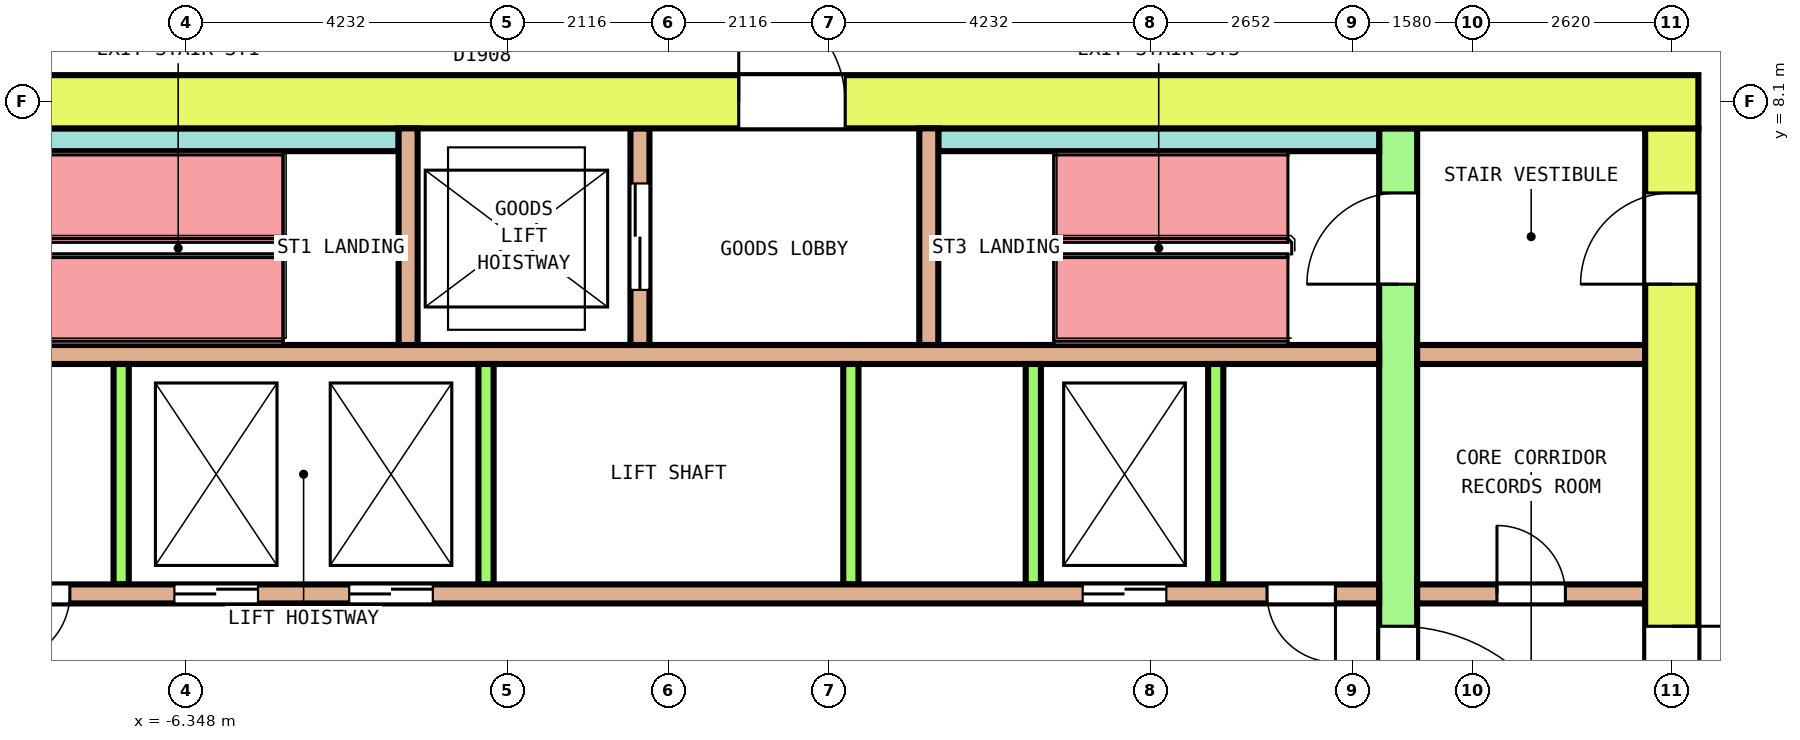
"""IFC4 building model, lengths in metres.
Left out: names, types, materials, properties, quantities, classifications, styles, units other than length and angle.
Written with IfcOpenShell. Run it as: python <this file> out.ifc"""

import sys

from ifc_helpers import new_model, si_unit, direction, frame, frame_2d, origin, place, context, subcontext, project, spatial, rectangle, extrude, element, fill, save


model = new_model("IFC4")
c1 = context("Model", 3, precision=1e-05, world=origin(), true_north=direction((0.0, 1.0)))
c2 = subcontext(c1, "Body", "Model", "MODEL_VIEW")
j1 = project(units=[si_unit("LENGTHUNIT", "METRE"), si_unit("PLANEANGLEUNIT", "RADIAN")], contexts=[c1])
p1 = place(None, origin())
s1 = spatial("IfcSite", under=j1, at=p1, CompositionType="ELEMENT")
p2 = place(p1, origin())
s2 = spatial("IfcBuilding", under=s1, at=p2, CompositionType="ELEMENT")
p3 = place(p2, frame((0.0, 0.0, 193.6)))
s3 = spatial("IfcBuildingStorey", under=s2, at=p3, CompositionType="ELEMENT", Elevation=193.6)
p4 = place(p3, frame((-13.55, 8.1, 0.0), z_axis=(0.0, 0.0, 1.0), x_axis=(1.0, 0.0, 0.0)))
e1 = element("IfcWall", 1, at=p4, inside=s3, PredefinedType="SHEAR", context=c2, shape_type="SweptSolid", body=[
    extrude(rectangle(XDim=27.1, YDim=0.7, at=frame_2d((13.55, 0.0))), origin(), (0.0, 0.0, 1.0), 4.1),
])
p5 = place(p4, frame((14.475, 0.0, 0.0)))
e2 = element("IfcOpeningElement", 2, at=p5, cuts=e1, PredefinedType="OPENING", context=c2, shape_type="SweptSolid", body=[
    extrude(rectangle(XDim=1.4, YDim=2.1, at=frame_2d((0.7, 1.05))), frame((0.0, 0.36, 0.0), z_axis=(0.0, -1.0, 0.0), x_axis=(1.0, 0.0, 0.0)), (0.0, 0.0, 1.0), 0.72),
])
p6 = place(p3, frame((13.2, -7.75, 0.0), z_axis=(0.0, 0.0, 1.0), x_axis=(0.0, 1.0, 0.0)))
e3 = element("IfcWall", 3, at=p6, inside=s3, PredefinedType="SHEAR", context=c2, shape_type="SweptSolid", body=[
    extrude(rectangle(XDim=15.5, YDim=0.7, at=frame_2d((7.75, 0.0))), origin(), (0.0, 0.0, 1.0), 4.1),
])
p7 = place(p6, frame((6.55, 0.0, 0.0)))
e4 = element("IfcOpeningElement", 4, at=p7, cuts=e3, PredefinedType="OPENING", context=c2, shape_type="SweptSolid", body=[
    extrude(rectangle(XDim=2.4, YDim=2.1, at=frame_2d((1.2, 1.05))), frame((0.0, 0.36, 0.0), z_axis=(0.0, -1.0, 0.0), x_axis=(1.0, 0.0, 0.0)), (0.0, 0.0, 1.0), 0.72),
])
p8 = place(p6, frame((13.45, 0.0, 0.0)))
e5 = element("IfcOpeningElement", 5, at=p8, cuts=e3, PredefinedType="OPENING", context=c2, shape_type="SweptSolid", body=[
    extrude(rectangle(XDim=1.2, YDim=2.1, at=frame_2d((0.6, 1.05))), frame((0.0, 0.36, 0.0), z_axis=(0.0, -1.0, 0.0), x_axis=(1.0, 0.0, 0.0)), (0.0, 0.0, 1.0), 0.72),
])
p9 = place(p6, frame((0.181, 0.0, 0.0)))
e6 = element("IfcOpeningElement", 6, at=p9, cuts=e3, PredefinedType="OPENING", context=c2, shape_type="SweptSolid", body=[
    extrude(rectangle(XDim=1.0, YDim=2.1, at=frame_2d((0.5, 1.05))), frame((0.0, 0.36, 0.0), z_axis=(0.0, -1.0, 0.0), x_axis=(1.0, 0.0, 0.0)), (0.0, 0.0, 1.0), 0.72),
])
p10 = place(p6, frame((1.669, 0.0, 0.0)))
e7 = element("IfcOpeningElement", 7, at=p10, cuts=e3, PredefinedType="OPENING", context=c2, shape_type="SweptSolid", body=[
    extrude(rectangle(XDim=1.0, YDim=2.1, at=frame_2d((0.5, 1.05))), frame((0.0, 0.36, 0.0), z_axis=(0.0, -1.0, 0.0), x_axis=(1.0, 0.0, 0.0)), (0.0, 0.0, 1.0), 0.72),
])
p11 = place(p3, frame((9.6, -7.75, 0.0), z_axis=(0.0, 0.0, 1.0), x_axis=(0.0, 1.0, 0.0)))
e8 = element("IfcWall", 8, at=p11, inside=s3, PredefinedType="SHEAR", context=c2, shape_type="SweptSolid", body=[
    extrude(rectangle(XDim=15.5, YDim=0.5, at=frame_2d((7.75, 0.0))), origin(), (0.0, 0.0, 1.0), 4.1),
])
p12 = place(p11, frame((6.55, 0.0, 0.0)))
e9 = element("IfcOpeningElement", 9, at=p12, cuts=e8, PredefinedType="OPENING", context=c2, shape_type="SweptSolid", body=[
    extrude(rectangle(XDim=2.4, YDim=2.1, at=frame_2d((1.2, 1.05))), frame((0.0, 0.26, 0.0), z_axis=(0.0, -1.0, 0.0), x_axis=(1.0, 0.0, 0.0)), (0.0, 0.0, 1.0), 0.52),
])
p13 = place(p11, frame((13.45, 0.0, 0.0)))
e10 = element("IfcOpeningElement", 10, at=p13, cuts=e8, PredefinedType="OPENING", context=c2, shape_type="SweptSolid", body=[
    extrude(rectangle(XDim=1.2, YDim=2.1, at=frame_2d((0.6, 1.05))), frame((0.0, 0.26, 0.0), z_axis=(0.0, -1.0, 0.0), x_axis=(1.0, 0.0, 0.0)), (0.0, 0.0, 1.0), 0.52),
])
p14 = place(p11, frame((0.95, 0.0, 0.0)))
e11 = element("IfcOpeningElement", 11, at=p14, cuts=e8, PredefinedType="OPENING", context=c2, shape_type="SweptSolid", body=[
    extrude(rectangle(XDim=1.0, YDim=2.1, at=frame_2d((0.5, 1.05))), frame((0.0, 0.26, 0.0), z_axis=(0.0, -1.0, 0.0), x_axis=(1.0, 0.0, 0.0)), (0.0, 0.0, 1.0), 0.52),
])
p15 = place(p3, frame((-9.35, 1.625, 0.0), z_axis=(0.0, 0.0, 1.0), x_axis=(1.0, 0.0, 0.0)))
e12 = element("IfcWall", 12, at=p15, inside=s3, PredefinedType="SOLIDWALL", context=c2, shape_type="SweptSolid", body=[
    extrude(rectangle(XDim=18.7, YDim=0.25, at=frame_2d((9.35, 0.0))), origin(), (0.0, 0.0, 1.0), 4.1),
])
p16 = place(p15, frame((2.85, 0.0, 0.0)))
e13 = element("IfcOpeningElement", 13, at=p16, cuts=e12, PredefinedType="OPENING", context=c2, shape_type="SweptSolid", body=[
    extrude(rectangle(XDim=1.1, YDim=2.1, at=frame_2d((0.55, 1.05))), frame((0.0, 0.135, 0.0), z_axis=(0.0, -1.0, 0.0), x_axis=(1.0, 0.0, 0.0)), (0.0, 0.0, 1.0), 0.27),
])
p17 = place(p15, frame((5.15, 0.0, 0.0)))
e14 = element("IfcOpeningElement", 14, at=p17, cuts=e12, PredefinedType="OPENING", context=c2, shape_type="SweptSolid", body=[
    extrude(rectangle(XDim=1.1, YDim=2.1, at=frame_2d((0.55, 1.05))), frame((0.0, 0.135, 0.0), z_axis=(0.0, -1.0, 0.0), x_axis=(1.0, 0.0, 0.0)), (0.0, 0.0, 1.0), 0.27),
])
p18 = place(p15, frame((14.8, 0.0, 0.0)))
e15 = element("IfcOpeningElement", 15, at=p18, cuts=e12, PredefinedType="OPENING", context=c2, shape_type="SweptSolid", body=[
    extrude(rectangle(XDim=1.1, YDim=2.1, at=frame_2d((0.55, 1.05))), frame((0.0, 0.135, 0.0), z_axis=(0.0, -1.0, 0.0), x_axis=(1.0, 0.0, 0.0)), (0.0, 0.0, 1.0), 0.27),
])
p19 = place(p15, frame((0.575, 0.0, 0.0)))
e16 = element("IfcOpeningElement", 16, at=p19, cuts=e12, PredefinedType="OPENING", context=c2, shape_type="SweptSolid", body=[
    extrude(rectangle(XDim=0.9, YDim=2.1, at=frame_2d((0.45, 1.05))), frame((0.0, 0.135, 0.0), z_axis=(0.0, -1.0, 0.0), x_axis=(1.0, 0.0, 0.0)), (0.0, 0.0, 1.0), 0.27),
])
p20 = place(p15, frame((17.225, 0.0, 0.0)))
e17 = element("IfcOpeningElement", 17, at=p20, cuts=e12, PredefinedType="OPENING", context=c2, shape_type="SweptSolid", body=[
    extrude(rectangle(XDim=0.9, YDim=2.1, at=frame_2d((0.45, 1.05))), frame((0.0, 0.135, 0.0), z_axis=(0.0, -1.0, 0.0), x_axis=(1.0, 0.0, 0.0)), (0.0, 0.0, 1.0), 0.27),
])
p21 = place(p3, frame((9.85, 1.625, 0.0), z_axis=(0.0, 0.0, 1.0), x_axis=(1.0, 0.0, 0.0)))
e18 = element("IfcWall", 18, at=p21, inside=s3, PredefinedType="SOLIDWALL", context=c2, shape_type="SweptSolid", body=[
    extrude(rectangle(XDim=3.0, YDim=0.25, at=frame_2d((1.5, 0.0))), origin(), (0.0, 0.0, 1.0), 4.1),
])
p22 = place(p21, frame((1.05, 0.0, 0.0)))
e19 = element("IfcOpeningElement", 19, at=p22, cuts=e18, PredefinedType="OPENING", context=c2, shape_type="SweptSolid", body=[
    extrude(rectangle(XDim=0.9, YDim=2.1, at=frame_2d((0.45, 1.05))), frame((0.0, 0.135, 0.0), z_axis=(0.0, -1.0, 0.0), x_axis=(1.0, 0.0, 0.0)), (0.0, 0.0, 1.0), 0.27),
])
p23 = place(p3, frame((-9.35, 4.775, 0.0), z_axis=(0.0, 0.0, 1.0), x_axis=(1.0, 0.0, 0.0)))
e20 = element("IfcWall", 20, at=p23, inside=s3, PredefinedType="SOLIDWALL", context=c2, shape_type="SweptSolid", body=[
    extrude(rectangle(XDim=18.7, YDim=0.25, at=frame_2d((9.35, 0.0))), origin(), (0.0, 0.0, 1.0), 4.1),
])
p24 = place(p3, frame((9.85, 4.775, 0.0), z_axis=(0.0, 0.0, 1.0), x_axis=(1.0, 0.0, 0.0)))
e21 = element("IfcWall", 21, at=p24, inside=s3, PredefinedType="SOLIDWALL", context=c2, shape_type="SweptSolid", body=[
    extrude(rectangle(XDim=3.0, YDim=0.25, at=frame_2d((1.5, 0.0))), origin(), (0.0, 0.0, 1.0), 4.1),
])
for number, where, z_axis, x_axis in (
    (22, (-7.2, 1.75, 0.0), (0.0, 0.0, 1.0), (0.0, 1.0, 0.0)),
    (23, (-2.4, 1.75, 0.0), (0.0, 0.0, 1.0), (0.0, 1.0, 0.0)),
    (24, (2.4, 1.75, 0.0), (0.0, 0.0, 1.0), (0.0, 1.0, 0.0)),
    (25, (4.8, 1.75, 0.0), (0.0, 0.0, 1.0), (0.0, 1.0, 0.0)),
    (26, (7.2, 1.75, 0.0), (0.0, 0.0, 1.0), (0.0, 1.0, 0.0)),
):
    element("IfcWall", number, at=place(p3, frame(where, z_axis=z_axis, x_axis=x_axis)), inside=s3, PredefinedType="SOLIDWALL", context=c2, shape_type="SweptSolid", body=[
        extrude(rectangle(XDim=2.9, YDim=0.2, at=frame_2d((1.45, 0.0))), origin(), (0.0, 0.0, 1.0), 4.1),
    ])
for number, where, z_axis, x_axis in (
    (27, (-9.35, 7.6, 0.0), (0.0, 0.0, 1.0), (1.0, 0.0, 0.0)),
    (28, (3.55, 7.6, 0.0), (0.0, 0.0, 1.0), (1.0, 0.0, 0.0)),
):
    element("IfcWall", number, at=place(p3, frame(where, z_axis=z_axis, x_axis=x_axis)), inside=s3, PredefinedType="SOLIDWALL", context=c2, shape_type="SweptSolid", body=[
        extrude(rectangle(XDim=5.8, YDim=0.3, at=frame_2d((2.9, 0.0))), origin(), (0.0, 0.0, 1.0), 4.1),
    ])
p25 = place(p3, frame((-3.425, 4.9, 0.0), z_axis=(0.0, 0.0, 1.0), x_axis=(0.0, 1.0, 0.0)))
e29 = element("IfcWall", 29, at=p25, inside=s3, PredefinedType="SOLIDWALL", context=c2, shape_type="SweptSolid", body=[
    extrude(rectangle(XDim=2.85, YDim=0.25, at=frame_2d((1.425, 0.0))), origin(), (0.0, 0.0, 1.0), 4.1),
])
p26 = place(p3, frame((-0.375, 4.9, 0.0), z_axis=(0.0, 0.0, 1.0), x_axis=(0.0, 1.0, 0.0)))
e30 = element("IfcWall", 30, at=p26, inside=s3, PredefinedType="SOLIDWALL", context=c2, shape_type="SweptSolid", body=[
    extrude(rectangle(XDim=2.85, YDim=0.25, at=frame_2d((1.425, 0.0))), origin(), (0.0, 0.0, 1.0), 4.1),
])
p27 = place(p26, frame((0.725, 0.0, 0.0)))
e31 = element("IfcOpeningElement", 31, at=p27, cuts=e30, PredefinedType="OPENING", context=c2, shape_type="SweptSolid", body=[
    extrude(rectangle(XDim=1.4, YDim=2.1, at=frame_2d((0.7, 1.05))), frame((0.0, 0.135, 0.0), z_axis=(0.0, -1.0, 0.0), x_axis=(1.0, 0.0, 0.0)), (0.0, 0.0, 1.0), 0.27),
])
p28 = place(p3, frame((3.425, 4.9, 0.0), z_axis=(0.0, 0.0, 1.0), x_axis=(0.0, 1.0, 0.0)))
e32 = element("IfcWall", 32, at=p28, inside=s3, PredefinedType="SOLIDWALL", context=c2, shape_type="SweptSolid", body=[
    extrude(rectangle(XDim=2.85, YDim=0.25, at=frame_2d((1.425, 0.0))), origin(), (0.0, 0.0, 1.0), 4.1),
])
p29 = place(p16, origin())
e33 = element("IfcDoor", 33, at=p29, inside=s3, OperationType="DOUBLE_DOOR_SLIDING", PredefinedType="DOOR", context=c2, shape_type="SweptSolid", body=[
    extrude(rectangle(XDim=1.1, YDim=2.1, at=frame_2d((0.55, 1.05))), frame((0.0, 0.075, 0.0), z_axis=(0.0, -1.0, 0.0), x_axis=(1.0, 0.0, 0.0)), (0.0, 0.0, 1.0), 0.15),
])
fill(e13, e33)
p30 = place(p17, origin())
e34 = element("IfcDoor", 34, at=p30, inside=s3, OperationType="DOUBLE_DOOR_SLIDING", PredefinedType="DOOR", context=c2, shape_type="SweptSolid", body=[
    extrude(rectangle(XDim=1.1, YDim=2.1, at=frame_2d((0.55, 1.05))), frame((0.0, 0.075, 0.0), z_axis=(0.0, -1.0, 0.0), x_axis=(1.0, 0.0, 0.0)), (0.0, 0.0, 1.0), 0.15),
])
fill(e14, e34)
p31 = place(p18, origin())
e35 = element("IfcDoor", 35, at=p31, inside=s3, OperationType="DOUBLE_DOOR_SLIDING", PredefinedType="DOOR", context=c2, shape_type="SweptSolid", body=[
    extrude(rectangle(XDim=1.1, YDim=2.1, at=frame_2d((0.55, 1.05))), frame((0.0, 0.075, 0.0), z_axis=(0.0, -1.0, 0.0), x_axis=(1.0, 0.0, 0.0)), (0.0, 0.0, 1.0), 0.15),
])
fill(e15, e35)
p32 = place(p27, origin())
e36 = element("IfcDoor", 36, at=p32, inside=s3, OperationType="DOUBLE_DOOR_SLIDING", PredefinedType="DOOR", context=c2, shape_type="SweptSolid", body=[
    extrude(rectangle(XDim=1.4, YDim=2.1, at=frame_2d((0.7, 1.05))), frame((0.0, 0.075, 0.0), z_axis=(0.0, -1.0, 0.0), x_axis=(1.0, 0.0, 0.0)), (0.0, 0.0, 1.0), 0.15),
])
fill(e31, e36)
p33 = place(p12, origin())
e37 = element("IfcDoor", 37, at=p33, inside=s3, OperationType="DOUBLE_DOOR_SINGLE_SWING", PredefinedType="DOOR", context=c2, shape_type="SweptSolid", body=[
    extrude(rectangle(XDim=2.4, YDim=2.1, at=frame_2d((1.2, 1.05))), frame((0.0, 0.2, 0.0), z_axis=(0.0, -1.0, 0.0), x_axis=(1.0, 0.0, 0.0)), (0.0, 0.0, 1.0), 0.4),
])
fill(e9, e37)
p34 = place(p7, origin())
e38 = element("IfcDoor", 38, at=p34, inside=s3, OperationType="DOUBLE_DOOR_SINGLE_SWING", PredefinedType="DOOR", context=c2, shape_type="SweptSolid", body=[
    extrude(rectangle(XDim=2.4, YDim=2.1, at=frame_2d((1.2, 1.05))), frame((0.0, 0.3, 0.0), z_axis=(0.0, -1.0, 0.0), x_axis=(1.0, 0.0, 0.0)), (0.0, 0.0, 1.0), 0.6),
])
fill(e4, e38)
p35 = place(p13, origin())
e39 = element("IfcDoor", 39, at=p35, inside=s3, OperationType="SINGLE_SWING_LEFT", PredefinedType="DOOR", context=c2, shape_type="SweptSolid", body=[
    extrude(rectangle(XDim=1.2, YDim=2.1, at=frame_2d((0.6, 1.05))), frame((0.0, 0.2, 0.0), z_axis=(0.0, -1.0, 0.0), x_axis=(1.0, 0.0, 0.0)), (0.0, 0.0, 1.0), 0.4),
])
fill(e10, e39)
p36 = place(p8, origin())
e40 = element("IfcDoor", 40, at=p36, inside=s3, OperationType="SINGLE_SWING_RIGHT", PredefinedType="DOOR", context=c2, shape_type="SweptSolid", body=[
    extrude(rectangle(XDim=1.2, YDim=2.1, at=frame_2d((0.6, 1.05))), frame((0.0, 0.3, 0.0), z_axis=(0.0, -1.0, 0.0), x_axis=(1.0, 0.0, 0.0)), (0.0, 0.0, 1.0), 0.6),
])
fill(e5, e40)
p37 = place(p5, origin())
e41 = element("IfcDoor", 41, at=p37, inside=s3, OperationType="DOUBLE_DOOR_SINGLE_SWING", PredefinedType="DOOR", context=c2, shape_type="SweptSolid", body=[
    extrude(rectangle(XDim=1.4, YDim=2.1, at=frame_2d((0.7, 1.05))), frame((0.0, 0.3, 0.0), z_axis=(0.0, -1.0, 0.0), x_axis=(1.0, 0.0, 0.0)), (0.0, 0.0, 1.0), 0.6),
])
fill(e2, e41)
p38 = place(p19, origin())
e42 = element("IfcDoor", 42, at=p38, inside=s3, OperationType="SINGLE_SWING_RIGHT", PredefinedType="DOOR", context=c2, shape_type="SweptSolid", body=[
    extrude(rectangle(XDim=0.9, YDim=2.1, at=frame_2d((0.45, 1.05))), frame((0.0, 0.075, 0.0), z_axis=(0.0, -1.0, 0.0), x_axis=(1.0, 0.0, 0.0)), (0.0, 0.0, 1.0), 0.15),
])
fill(e16, e42)
p39 = place(p20, origin())
e43 = element("IfcDoor", 43, at=p39, inside=s3, OperationType="SINGLE_SWING_LEFT", PredefinedType="DOOR", context=c2, shape_type="SweptSolid", body=[
    extrude(rectangle(XDim=0.9, YDim=2.1, at=frame_2d((0.45, 1.05))), frame((0.0, 0.075, 0.0), z_axis=(0.0, -1.0, 0.0), x_axis=(1.0, 0.0, 0.0)), (0.0, 0.0, 1.0), 0.15),
])
fill(e17, e43)
p40 = place(p22, origin())
e44 = element("IfcDoor", 44, at=p40, inside=s3, OperationType="SINGLE_SWING_RIGHT", PredefinedType="DOOR", context=c2, shape_type="SweptSolid", body=[
    extrude(rectangle(XDim=0.9, YDim=2.1, at=frame_2d((0.45, 1.05))), frame((0.0, 0.075, 0.0), z_axis=(0.0, -1.0, 0.0), x_axis=(1.0, 0.0, 0.0)), (0.0, 0.0, 1.0), 0.15),
])
fill(e19, e44)
save(model, sys.argv[1])
